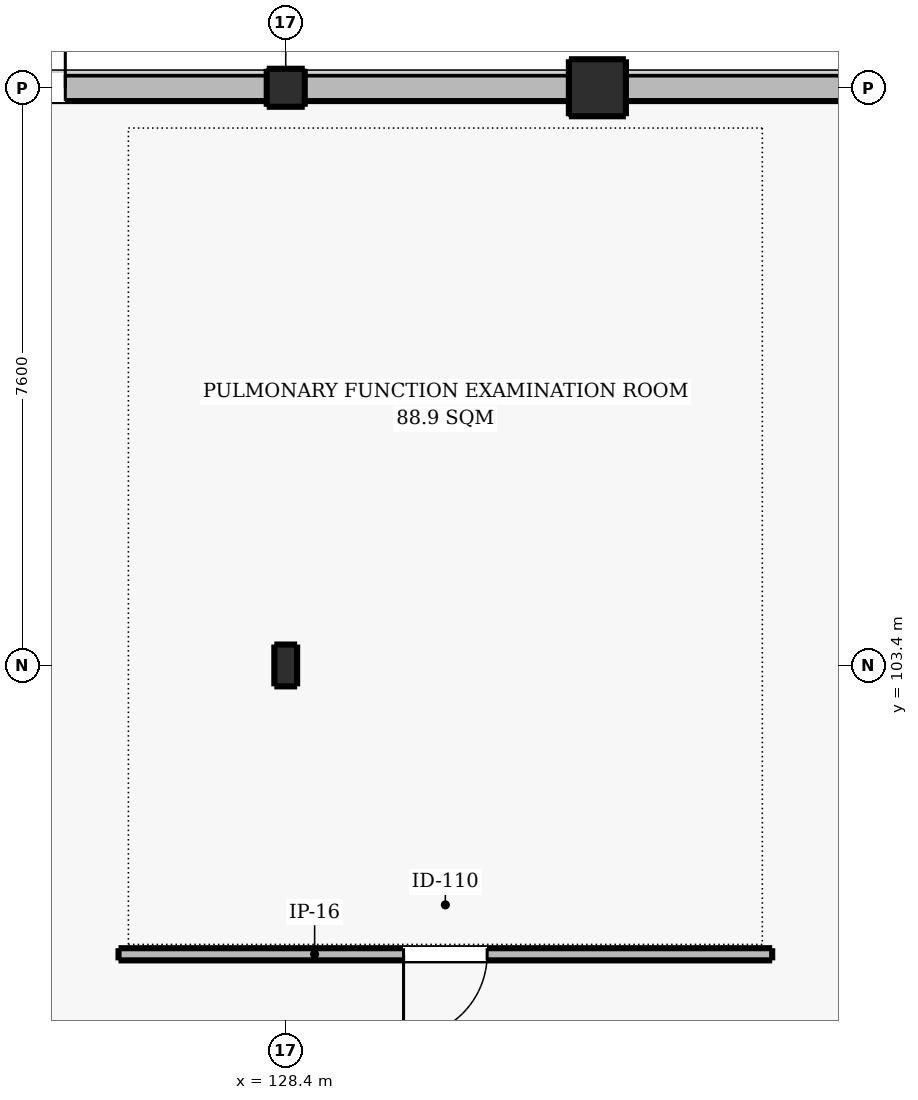
"""IFC4 building model, lengths in metres.
Left out: names, types, materials, properties, quantities, classifications, styles, units other than length and angle.
Written with IfcOpenShell. Run it as: python <this file> out.ifc"""

import sys

from ifc_helpers import new_model, si_unit, direction, frame, frame_2d, origin, origin_2d, place, context, subcontext, project, spatial, rectangle, circle, i_section, extrude, element, fill, save


model = new_model("IFC4")
c1 = context("Model", 3, precision=1e-05, world=origin(), true_north=direction((0.0, 1.0)))
c2 = subcontext(c1, "Body", "Model", "MODEL_VIEW")
j1 = project(units=[si_unit("LENGTHUNIT", "METRE"), si_unit("PLANEANGLEUNIT", "RADIAN")], contexts=[c1])
p1 = place(None, origin())
s1 = spatial("IfcSite", under=j1, at=p1, CompositionType="ELEMENT")
p2 = place(p1, origin())
s2 = spatial("IfcBuilding", under=s1, at=p2, CompositionType="ELEMENT")
p3 = place(p2, origin())
s3 = spatial("IfcBuildingStorey", under=s2, at=p3, CompositionType="ELEMENT", Elevation=0.0)
p4 = place(p3, frame((128.4, 103.4, 0.0), z_axis=(0.0, 0.0, 1.0), x_axis=(1.0, 0.0, 0.0)))
e1 = element("IfcColumn", 1, at=p4, inside=s3, PredefinedType="COLUMN", context=c2, shape_type="SweptSolid", body=[
    extrude(i_section(OverallWidth=0.3, OverallDepth=0.55, WebThickness=0.015, FlangeThickness=0.029, FilletRadius=0.027, at=origin_2d()), origin(), (0.0, 0.0, 1.0), 5.1),
])
p5 = place(p3, frame((128.4, 111.0, 0.0), z_axis=(0.0, 0.0, 1.0), x_axis=(1.0, 0.0, 0.0)))
e2 = element("IfcColumn", 2, at=p5, inside=s3, PredefinedType="COLUMN", context=c2, shape_type="SweptSolid", body=[
    extrude(circle(Radius=0.35, at=origin_2d()), origin(), (0.0, 0.0, 1.0), 5.1),
])
p6 = place(p3, frame((132.5, 111.0, 0.0), z_axis=(0.0, 0.0, 1.0), x_axis=(1.0, 0.0, 0.0)))
e3 = element("IfcColumn", 3, at=p6, inside=s3, PredefinedType="PILASTER", context=c2, shape_type="SweptSolid", body=[
    extrude(rectangle(XDim=0.75, YDim=0.75, at=origin_2d()), origin(), (0.0, 0.0, 1.0), 5.1),
])
p7 = place(p3, frame((111.0, 111.0, 0.0), z_axis=(0.0, 0.0, 1.0), x_axis=(1.0, 0.0, 0.0)))
e4 = element("IfcWall", 4, at=p7, inside=s3, PredefinedType="SOLIDWALL", context=c2, shape_type="SweptSolid", body=[
    extrude(rectangle(XDim=51.0, YDim=0.35, at=frame_2d((25.5, 0.0))), origin(), (0.0, 0.0, 1.0), 4.28),
])
p8 = place(p7, frame((11.9, 0.0, 0.0)))
e5 = element("IfcOpeningElement", 5, at=p8, cuts=e4, PredefinedType="OPENING", context=c2, shape_type="SweptSolid", body=[
    extrude(rectangle(XDim=2.6, YDim=2.6, at=frame_2d((1.3, 1.3))), frame((0.0, 0.185, 0.0), z_axis=(0.0, -1.0, 0.0), x_axis=(1.0, 0.0, 0.0)), (0.0, 0.0, 1.0), 0.37),
])
p9 = place(p7, frame((28.7, 0.0, 0.0)))
e6 = element("IfcOpeningElement", 6, at=p9, cuts=e4, PredefinedType="OPENING", context=c2, shape_type="SweptSolid", body=[
    extrude(rectangle(XDim=2.6, YDim=2.6, at=frame_2d((1.3, 1.3))), frame((0.0, 0.185, 0.0), z_axis=(0.0, -1.0, 0.0), x_axis=(1.0, 0.0, 0.0)), (0.0, 0.0, 1.0), 0.37),
])
p10 = place(p7, frame((1.193, 0.0, 1.05)))
e7 = element("IfcOpeningElement", 7, at=p10, cuts=e4, PredefinedType="OPENING", context=c2, shape_type="SweptSolid", body=[
    extrude(rectangle(XDim=2.25, YDim=1.7, at=frame_2d((1.125, 0.85))), frame((0.0, 0.185, 0.0), z_axis=(0.0, -1.0, 0.0), x_axis=(1.0, 0.0, 0.0)), (0.0, 0.0, 1.0), 0.37),
])
p11 = place(p7, frame((5.83, 0.0, 1.05)))
e8 = element("IfcOpeningElement", 8, at=p11, cuts=e4, PredefinedType="OPENING", context=c2, shape_type="SweptSolid", body=[
    extrude(rectangle(XDim=2.25, YDim=1.7, at=frame_2d((1.125, 0.85))), frame((0.0, 0.185, 0.0), z_axis=(0.0, -1.0, 0.0), x_axis=(1.0, 0.0, 0.0)), (0.0, 0.0, 1.0), 0.37),
])
p12 = place(p7, frame((38.284, 0.0, 1.05)))
e9 = element("IfcOpeningElement", 9, at=p12, cuts=e4, PredefinedType="OPENING", context=c2, shape_type="SweptSolid", body=[
    extrude(rectangle(XDim=2.25, YDim=1.7, at=frame_2d((1.125, 0.85))), frame((0.0, 0.185, 0.0), z_axis=(0.0, -1.0, 0.0), x_axis=(1.0, 0.0, 0.0)), (0.0, 0.0, 1.0), 0.37),
])
p13 = place(p7, frame((47.557, 0.0, 1.05)))
e10 = element("IfcOpeningElement", 10, at=p13, cuts=e4, PredefinedType="OPENING", context=c2, shape_type="SweptSolid", body=[
    extrude(rectangle(XDim=2.25, YDim=1.7, at=frame_2d((1.125, 0.85))), frame((0.0, 0.185, 0.0), z_axis=(0.0, -1.0, 0.0), x_axis=(1.0, 0.0, 0.0)), (0.0, 0.0, 1.0), 0.37),
])
p14 = place(p3, frame((126.2, 99.6, 0.0), z_axis=(0.0, 0.0, 1.0), x_axis=(1.0, 0.0, 0.0)))
e11 = element("IfcWall", 11, at=p14, inside=s3, PredefinedType="PARTITIONING", context=c2, shape_type="SweptSolid", body=[
    extrude(rectangle(XDim=8.6, YDim=0.16, at=frame_2d((4.3, 0.0))), origin(), (0.0, 0.0, 1.0), 4.82),
])
p15 = place(p14, frame((3.75, 0.0, 0.0)))
e12 = element("IfcOpeningElement", 12, at=p15, cuts=e11, PredefinedType="OPENING", context=c2, shape_type="SweptSolid", body=[
    extrude(rectangle(XDim=1.1, YDim=2.15, at=frame_2d((0.55, 1.075))), frame((0.0, 0.09, 0.0), z_axis=(0.0, -1.0, 0.0), x_axis=(1.0, 0.0, 0.0)), (0.0, 0.0, 1.0), 0.18),
])
p16 = place(p8, origin())
e13 = element("IfcDoor", 13, at=p16, inside=s3, OperationType="DOUBLE_DOOR_SINGLE_SWING", PredefinedType="DOOR", context=c2, shape_type="SweptSolid", body=[
    extrude(rectangle(XDim=2.6, YDim=2.6, at=frame_2d((1.3, 1.3))), frame((0.0, 0.025, 0.0), z_axis=(0.0, -1.0, 0.0), x_axis=(1.0, 0.0, 0.0)), (0.0, 0.0, 1.0), 0.05),
])
fill(e5, e13)
p17 = place(p15, frame((1.1, 0.0, 0.0), z_axis=(0.0, 0.0, 1.0), x_axis=(-1.0, 0.0, 0.0)))
e14 = element("IfcDoor", 14, at=p17, inside=s3, OperationType="SINGLE_SWING_LEFT", PredefinedType="DOOR", context=c2, shape_type="SweptSolid", body=[
    extrude(rectangle(XDim=1.1, YDim=2.15, at=frame_2d((0.55, 1.075))), frame((0.0, 0.025, 0.0), z_axis=(0.0, -1.0, 0.0), x_axis=(1.0, 0.0, 0.0)), (0.0, 0.0, 1.0), 0.05),
])
fill(e12, e14)
save(model, sys.argv[1])
